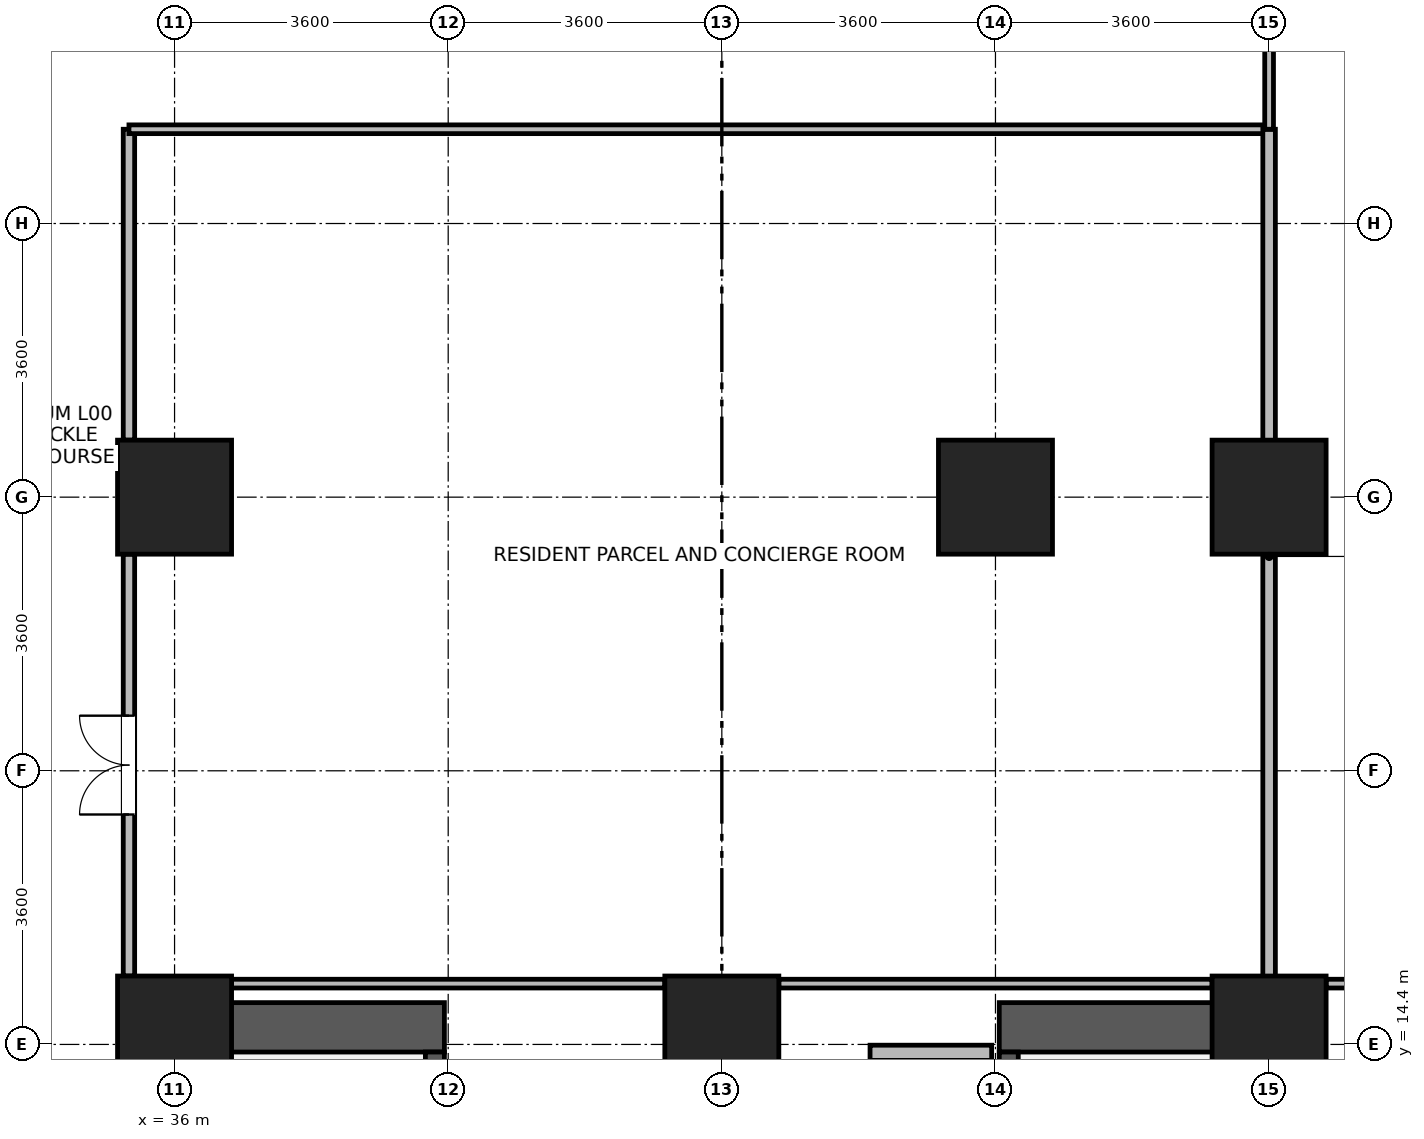
"""IFC4 building model, lengths in metres.
Left out: names, types, materials, properties, quantities, classifications, styles, units other than length and angle.
Written with IfcOpenShell. Run it as: python <this file> out.ifc"""

import sys

from ifc_helpers import new_model, si_unit, direction, frame, frame_2d, origin, origin_2d, place, context, subcontext, project, spatial, rectangle, extrude, source, transform, mapped, element, fill, save


model = new_model("IFC4")
c1 = context("Model", 3, precision=1e-05, world=origin(), true_north=direction((0.0, 1.0)))
c2 = subcontext(c1, "Body", "Model", "MODEL_VIEW")
j1 = project(units=[si_unit("LENGTHUNIT", "METRE"), si_unit("PLANEANGLEUNIT", "RADIAN")], contexts=[c1])
p1 = place(None, origin())
s1 = spatial("IfcSite", under=j1, at=p1, CompositionType="ELEMENT")
p2 = place(p1, origin())
s2 = spatial("IfcBuilding", under=s1, at=p2, CompositionType="ELEMENT")
p3 = place(p2, origin())
s3 = spatial("IfcBuildingStorey", under=s2, at=p3, CompositionType="ELEMENT", Elevation=0.0)
for number, where, z_axis, x_axis in (
    (1, (36.025, 6.65, 0.0), (0.0, 0.0, 1.0), (0.0, 1.0, 0.0)),
    (2, (50.375, 6.65, 0.0), (0.0, 0.0, 1.0), (0.0, 1.0, 0.0)),
):
    element("IfcWall", number, at=place(p3, frame(where, z_axis=z_axis, x_axis=x_axis)), inside=s3, PredefinedType="SHEAR", context=c2, shape_type="SweptSolid", body=[
        extrude(rectangle(XDim=8.3, YDim=0.65, at=frame_2d((4.15, 0.0))), origin(), (0.0, 0.0, 1.0), 5.12),
    ])
for number, where, z_axis, x_axis in (
    (3, (36.35, 14.625, 0.0), (0.0, 0.0, 1.0), (1.0, 0.0, 0.0)),
    (4, (46.85, 14.625, 0.0), (0.0, 0.0, 1.0), (1.0, 0.0, 0.0)),
):
    element("IfcWall", number, at=place(p3, frame(where, z_axis=z_axis, x_axis=x_axis)), inside=s3, PredefinedType="SHEAR", context=c2, shape_type="SweptSolid", body=[
        extrude(rectangle(XDim=3.2, YDim=0.65, at=frame_2d((1.6, 0.0))), origin(), (0.0, 0.0, 1.0), 5.12),
    ])
p4 = place(p3, frame((39.425, 7.3, 0.0), z_axis=(0.0, 0.0, 1.0), x_axis=(0.0, 1.0, 0.0)))
e5 = element("IfcWall", 5, at=p4, inside=s3, PredefinedType="SHEAR", context=c2, shape_type="SweptSolid", body=[
    extrude(rectangle(XDim=7.0, YDim=0.25, at=frame_2d((3.5, 0.0))), origin(), (0.0, 0.0, 1.0), 5.12),
])
p5 = place(p4, frame((0.15, 0.0, 0.0)))
e6 = element("IfcOpeningElement", 6, at=p5, cuts=e5, PredefinedType="OPENING", context=c2, shape_type="SweptSolid", body=[
    extrude(rectangle(XDim=1.1, YDim=2.08, at=frame_2d((0.55, 1.04))), frame((0.0, 0.135, 0.0), z_axis=(0.0, -1.0, 0.0), x_axis=(1.0, 0.0, 0.0)), (0.0, 0.0, 1.0), 0.27),
])
p6 = place(p3, frame((46.975, 7.3, 0.0), z_axis=(0.0, 0.0, 1.0), x_axis=(0.0, 1.0, 0.0)))
e7 = element("IfcWall", 7, at=p6, inside=s3, PredefinedType="SHEAR", context=c2, shape_type="SweptSolid", body=[
    extrude(rectangle(XDim=7.0, YDim=0.25, at=frame_2d((3.5, 0.0))), origin(), (0.0, 0.0, 1.0), 5.12),
])
p7 = place(p6, frame((0.15, 0.0, 0.0)))
e8 = element("IfcOpeningElement", 8, at=p7, cuts=e7, PredefinedType="OPENING", context=c2, shape_type="SweptSolid", body=[
    extrude(rectangle(XDim=1.1, YDim=2.08, at=frame_2d((0.55, 1.04))), frame((0.0, 0.135, 0.0), z_axis=(0.0, -1.0, 0.0), x_axis=(1.0, 0.0, 0.0)), (0.0, 0.0, 1.0), 0.27),
])
m1 = source(origin(), c2, "Body", "SweptSolid", [
    extrude(rectangle(XDim=1.5, YDim=1.5, at=origin_2d()), origin(), (0.0, 0.0, 1.0), 5.4),
])
for number, where, z_axis, x_axis in (
    (9, (36.0, 21.6, 0.0), (0.0, 0.0, 1.0), (1.0, 0.0, 0.0)),
    (10, (46.8, 21.6, 0.0), (0.0, 0.0, 1.0), (1.0, 0.0, 0.0)),
    (11, (36.0, 14.55, 0.0), (0.0, 0.0, 1.0), (1.0, 0.0, 0.0)),
    (12, (43.2, 14.55, 0.0), (0.0, 0.0, 1.0), (1.0, 0.0, 0.0)),
    (13, (50.4, 14.55, 0.0), (0.0, 0.0, 1.0), (1.0, 0.0, 0.0)),
    (14, (50.4, 21.6, 0.0), (0.0, 0.0, 1.0), (1.0, 0.0, 0.0)),
):
    element("IfcColumn", number, at=place(p3, frame(where, z_axis=z_axis, x_axis=x_axis)), inside=s3, PredefinedType="COLUMN", context=c2, shape_type="MappedRepresentation", body=[
        mapped(m1, transform((0.0, 0.0, 0.0), x_axis=(1.0, 0.0, 0.0), y_axis=(0.0, 1.0, 0.0), z_axis=(0.0, 0.0, 1.0), scale=1.0)),
    ])
p8 = place(p3, frame((45.15, 14.29, 0.0), z_axis=(0.0, 0.0, 1.0), x_axis=(1.0, 0.0, 0.0)))
e15 = element("IfcWall", 15, at=p8, inside=s3, PredefinedType="PARTITIONING", context=c2, shape_type="SweptSolid", body=[
    extrude(rectangle(XDim=1.6, YDim=0.2, at=frame_2d((0.8, 0.0))), origin(), (0.0, 0.0, 1.0), 3.9),
])
p9 = place(p3, frame((35.4, 15.3, 0.0), z_axis=(0.0, 0.0, 1.0), x_axis=(0.0, 1.0, 0.0)))
e16 = element("IfcWall", 16, at=p9, inside=s3, PredefinedType="PARTITIONING", context=c2, shape_type="SweptSolid", body=[
    extrude(rectangle(XDim=5.55, YDim=0.15, at=frame_2d((2.775, 0.0))), origin(), (0.0, 0.0, 1.0), 5.1),
])
p10 = place(p9, frame((2.125, 0.0, 0.0)))
e17 = element("IfcOpeningElement", 17, at=p10, cuts=e16, PredefinedType="OPENING", context=c2, shape_type="SweptSolid", body=[
    extrude(rectangle(XDim=1.3, YDim=2.12, at=frame_2d((0.65, 1.06))), frame((0.0, 0.085, 0.0), z_axis=(0.0, -1.0, 0.0), x_axis=(1.0, 0.0, 0.0)), (0.0, 0.0, 1.0), 0.17),
])
p11 = place(p3, frame((35.4, 22.35, 0.0), z_axis=(0.0, 0.0, 1.0), x_axis=(0.0, 1.0, 0.0)))
e18 = element("IfcWall", 18, at=p11, inside=s3, PredefinedType="PARTITIONING", context=c2, shape_type="SweptSolid", body=[
    extrude(rectangle(XDim=4.09, YDim=0.15, at=frame_2d((2.045, 0.0))), origin(), (0.0, 0.0, 1.0), 5.1),
])
p12 = place(p3, frame((51.15, 15.2, 0.0), z_axis=(0.0, 0.0, 1.0), x_axis=(1.0, 0.0, 0.0)))
e19 = element("IfcWall", 19, at=p12, inside=s3, PredefinedType="PARTITIONING", context=c2, shape_type="SweptSolid", body=[
    extrude(rectangle(XDim=2.5, YDim=0.115, at=frame_2d((1.25, 0.0))), origin(), (0.0, 0.0, 1.0), 5.1),
])
for number, where, z_axis, x_axis in (
    (20, (36.75, 15.2, 0.0), (0.0, 0.0, 1.0), (1.0, 0.0, 0.0)),
    (21, (43.95, 15.2, 0.0), (0.0, 0.0, 1.0), (1.0, 0.0, 0.0)),
):
    element("IfcWall", number, at=place(p3, frame(where, z_axis=z_axis, x_axis=x_axis)), inside=s3, PredefinedType="PARTITIONING", context=c2, shape_type="SweptSolid", body=[
        extrude(rectangle(XDim=5.7, YDim=0.115, at=frame_2d((2.85, 0.0))), origin(), (0.0, 0.0, 1.0), 5.1),
    ])
p13 = place(p3, frame((35.4, 26.44, 0.0), z_axis=(0.0, 0.0, 1.0), x_axis=(1.0, 0.0, 0.0)))
e22 = element("IfcWall", 22, at=p13, inside=s3, PredefinedType="PARTITIONING", context=c2, shape_type="SweptSolid", body=[
    extrude(rectangle(XDim=15.0, YDim=0.115, at=frame_2d((7.5, 0.0))), origin(), (0.0, 0.0, 1.0), 5.1),
])
p14 = place(p3, frame((50.4, 15.2, 0.0), z_axis=(0.0, 0.0, 1.0), x_axis=(0.0, 1.0, 0.0)))
e23 = element("IfcWall", 23, at=p14, inside=s3, PredefinedType="PARTITIONING", context=c2, shape_type="SweptSolid", body=[
    extrude(rectangle(XDim=11.24, YDim=0.165, at=frame_2d((5.62, 0.0))), origin(), (0.0, 0.0, 1.0), 4.5),
])
p15 = place(p3, frame((50.4, 26.44, 0.0), z_axis=(0.0, 0.0, 1.0), x_axis=(0.0, 1.0, 0.0)))
e24 = element("IfcWall", 24, at=p15, inside=s3, PredefinedType="PARTITIONING", context=c2, shape_type="SweptSolid", body=[
    extrude(rectangle(XDim=1.46, YDim=0.115, at=frame_2d((0.73, 0.0))), origin(), (0.0, 0.0, 1.0), 5.1),
])
p16 = place(p10, origin())
e25 = element("IfcDoor", 25, at=p16, inside=s3, OperationType="DOUBLE_DOOR_SINGLE_SWING", PredefinedType="DOOR", context=c2, shape_type="SweptSolid", body=[
    extrude(rectangle(XDim=1.3, YDim=2.12, at=frame_2d((0.65, 1.06))), frame((0.0, 0.025, 0.0), z_axis=(0.0, -1.0, 0.0), x_axis=(1.0, 0.0, 0.0)), (0.0, 0.0, 1.0), 0.05),
])
fill(e17, e25)
save(model, sys.argv[1])
